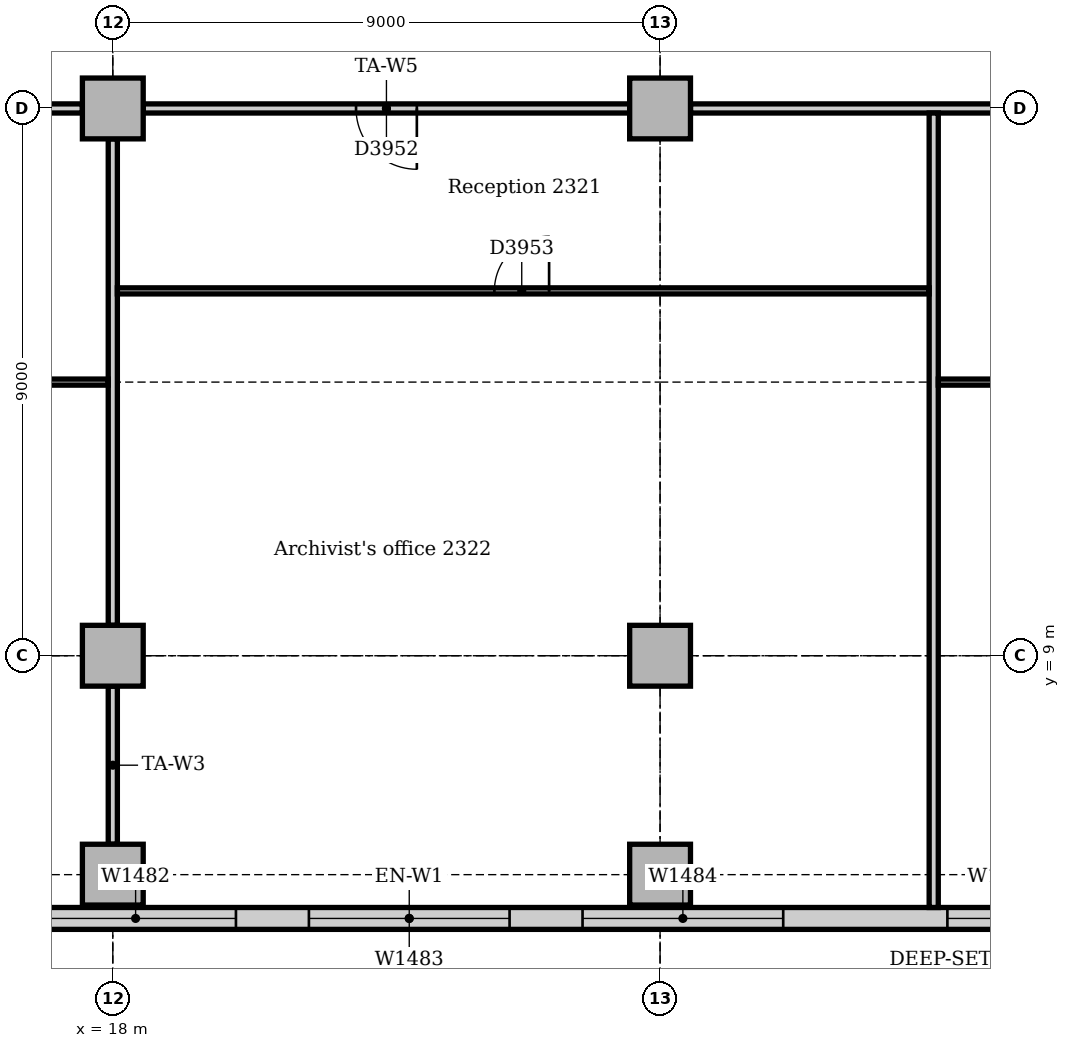
"""IFC4 building model, lengths in metres.
Left out: names, types, materials, properties, quantities, classifications, styles, units other than length and angle.
Written with IfcOpenShell. Run it as: python <this file> out.ifc"""

import sys

from ifc_helpers import new_model, si_unit, direction, frame, frame_2d, origin, origin_2d, place, context, subcontext, project, spatial, rectangle, extrude, element, fill, save


model = new_model("IFC4")
c1 = context("Model", 3, precision=1e-05, world=origin(), true_north=direction((0.0, 1.0)))
c2 = subcontext(c1, "Body", "Model", "MODEL_VIEW")
j1 = project(units=[si_unit("LENGTHUNIT", "METRE"), si_unit("PLANEANGLEUNIT", "RADIAN")], contexts=[c1])
p1 = place(None, origin())
s1 = spatial("IfcSite", under=j1, at=p1, CompositionType="ELEMENT")
p2 = place(p1, origin())
s2 = spatial("IfcBuilding", under=s1, at=p2, CompositionType="ELEMENT")
p3 = place(p2, frame((0.0, 0.0, 100.0)))
s3 = spatial("IfcBuildingStorey", under=s2, at=p3, CompositionType="ELEMENT", Elevation=100.0)
for number, where, z_axis, x_axis in (
    (1, (18.0, 5.4, -0.15), (0.0, 0.0, 1.0), (1.0, 0.0, 0.0)),
    (2, (27.0, 5.4, -0.15), (0.0, 0.0, 1.0), (1.0, 0.0, 0.0)),
):
    element("IfcColumn", number, at=place(p3, frame(where, z_axis=z_axis, x_axis=x_axis)), inside=s3, PredefinedType="COLUMN", context=c2, shape_type="SweptSolid", body=[
        extrude(rectangle(XDim=1.0, YDim=1.0, at=origin_2d()), origin(), (0.0, 0.0, 1.0), 4.0),
    ])
for number, where, z_axis, x_axis in (
    (3, (18.0, 9.0, 0.0), (0.0, 0.0, 1.0), (1.0, 0.0, 0.0)),
    (4, (18.0, 18.0, 0.0), (0.0, 0.0, 1.0), (1.0, 0.0, 0.0)),
    (5, (27.0, 9.0, 0.0), (0.0, 0.0, 1.0), (1.0, 0.0, 0.0)),
    (6, (27.0, 18.0, 0.0), (0.0, 0.0, 1.0), (1.0, 0.0, 0.0)),
):
    element("IfcColumn", number, at=place(p3, frame(where, z_axis=z_axis, x_axis=x_axis)), inside=s3, PredefinedType="COLUMN", context=c2, shape_type="SweptSolid", body=[
        extrude(rectangle(XDim=1.0, YDim=1.0, at=origin_2d()), origin(), (0.0, 0.0, 1.0), 3.85),
    ])
p4 = place(p3, frame((4.243, 4.68, 0.0), z_axis=(0.0, 0.0, 1.0), x_axis=(1.0, 0.0, 0.0)))
e7 = element("IfcWall", 7, at=p4, inside=s3, PredefinedType="STANDARD", context=c2, shape_type="SweptSolid", body=[
    extrude(rectangle(XDim=37.265, YDim=0.36, at=frame_2d((18.632, 0.0))), origin(), (0.0, 0.0, 1.0), 3.85),
])
p5 = place(p4, frame((3.482, 0.0, 0.9)))
e8 = element("IfcOpeningElement", 8, at=p5, cuts=e7, PredefinedType="OPENING", context=c2, shape_type="SweptSolid", body=[
    extrude(rectangle(XDim=3.3, YDim=1.6, at=frame_2d((1.65, 0.8))), frame((0.0, 0.19, 0.0), z_axis=(0.0, -1.0, 0.0), x_axis=(1.0, 0.0, 0.0)), (0.0, 0.0, 1.0), 0.38),
])
p6 = place(p4, frame((8.732, 0.0, 0.0)))
e9 = element("IfcOpeningElement", 9, at=p6, cuts=e7, PredefinedType="OPENING", context=c2, shape_type="SweptSolid", body=[
    extrude(rectangle(XDim=1.8, YDim=2.4, at=frame_2d((0.9, 1.2))), frame((0.0, 0.19, 0.0), z_axis=(0.0, -1.0, 0.0), x_axis=(1.0, 0.0, 0.0)), (0.0, 0.0, 1.0), 0.38),
])
p7 = place(p4, frame((12.482, 0.0, 0.9)))
e10 = element("IfcOpeningElement", 10, at=p7, cuts=e7, PredefinedType="OPENING", context=c2, shape_type="SweptSolid", body=[
    extrude(rectangle(XDim=3.3, YDim=1.6, at=frame_2d((1.65, 0.8))), frame((0.0, 0.19, 0.0), z_axis=(0.0, -1.0, 0.0), x_axis=(1.0, 0.0, 0.0)), (0.0, 0.0, 1.0), 0.38),
])
p8 = place(p4, frame((16.982, 0.0, 0.9)))
e11 = element("IfcOpeningElement", 11, at=p8, cuts=e7, PredefinedType="OPENING", context=c2, shape_type="SweptSolid", body=[
    extrude(rectangle(XDim=3.3, YDim=1.6, at=frame_2d((1.65, 0.8))), frame((0.0, 0.19, 0.0), z_axis=(0.0, -1.0, 0.0), x_axis=(1.0, 0.0, 0.0)), (0.0, 0.0, 1.0), 0.38),
])
p9 = place(p4, frame((21.482, 0.0, 0.9)))
e12 = element("IfcOpeningElement", 12, at=p9, cuts=e7, PredefinedType="OPENING", context=c2, shape_type="SweptSolid", body=[
    extrude(rectangle(XDim=3.3, YDim=1.6, at=frame_2d((1.65, 0.8))), frame((0.0, 0.19, 0.0), z_axis=(0.0, -1.0, 0.0), x_axis=(1.0, 0.0, 0.0)), (0.0, 0.0, 1.0), 0.38),
])
p10 = place(p4, frame((27.482, 0.0, 0.9)))
e13 = element("IfcOpeningElement", 13, at=p10, cuts=e7, PredefinedType="OPENING", context=c2, shape_type="SweptSolid", body=[
    extrude(rectangle(XDim=1.8, YDim=1.6, at=frame_2d((0.9, 0.8))), frame((0.0, 0.19, 0.0), z_axis=(0.0, -1.0, 0.0), x_axis=(1.0, 0.0, 0.0)), (0.0, 0.0, 1.0), 0.38),
])
p11 = place(p4, frame((30.482, 0.0, 0.9)))
e14 = element("IfcOpeningElement", 14, at=p11, cuts=e7, PredefinedType="OPENING", context=c2, shape_type="SweptSolid", body=[
    extrude(rectangle(XDim=3.3, YDim=1.6, at=frame_2d((1.65, 0.8))), frame((0.0, 0.19, 0.0), z_axis=(0.0, -1.0, 0.0), x_axis=(1.0, 0.0, 0.0)), (0.0, 0.0, 1.0), 0.38),
])
p12 = place(p3, frame((27.5, 18.0, 0.0), z_axis=(0.0, 0.0, 1.0), x_axis=(1.0, 0.0, 0.0)))
e15 = element("IfcWall", 15, at=p12, inside=s3, PredefinedType="PARTITIONING", context=c2, shape_type="SweptSolid", body=[
    extrude(rectangle(XDim=8.0, YDim=0.15, at=frame_2d((4.0, 0.0))), origin(), (0.0, 0.0, 1.0), 3.158),
])
p13 = place(p3, frame((18.5, 18.0, 0.0), z_axis=(0.0, 0.0, 1.0), x_axis=(1.0, 0.0, 0.0)))
e16 = element("IfcWall", 16, at=p13, inside=s3, PredefinedType="PARTITIONING", context=c2, shape_type="SweptSolid", body=[
    extrude(rectangle(XDim=8.0, YDim=0.15, at=frame_2d((4.0, 0.0))), origin(), (0.0, 0.0, 1.0), 3.158),
])
p14 = place(p13, frame((3.5, 0.0, 0.0)))
e17 = element("IfcOpeningElement", 17, at=p14, cuts=e16, PredefinedType="OPENING", context=c2, shape_type="SweptSolid", body=[
    extrude(rectangle(XDim=1.0, YDim=2.1, at=frame_2d((0.5, 1.05))), frame((0.0, 0.085, 0.0), z_axis=(0.0, -1.0, 0.0), x_axis=(1.0, 0.0, 0.0)), (0.0, 0.0, 1.0), 0.17),
])
p15 = place(p3, frame((9.5, 18.0, 0.0), z_axis=(0.0, 0.0, 1.0), x_axis=(1.0, 0.0, 0.0)))
e18 = element("IfcWall", 18, at=p15, inside=s3, PredefinedType="PARTITIONING", context=c2, shape_type="SweptSolid", body=[
    extrude(rectangle(XDim=8.0, YDim=0.15, at=frame_2d((4.0, 0.0))), origin(), (0.0, 0.0, 1.0), 3.158),
])
p16 = place(p15, frame((3.5, 0.0, 0.0)))
e19 = element("IfcOpeningElement", 19, at=p16, cuts=e18, PredefinedType="OPENING", context=c2, shape_type="SweptSolid", body=[
    extrude(rectangle(XDim=1.0, YDim=2.1, at=frame_2d((0.5, 1.05))), frame((0.0, 0.085, 0.0), z_axis=(0.0, -1.0, 0.0), x_axis=(1.0, 0.0, 0.0)), (0.0, 0.0, 1.0), 0.17),
])
p17 = place(p3, frame((18.0, 5.9, 0.0), z_axis=(0.0, 0.0, 1.0), x_axis=(0.0, 1.0, 0.0)))
e20 = element("IfcWall", 20, at=p17, inside=s3, PredefinedType="PARTITIONING", context=c2, shape_type="SweptSolid", body=[
    extrude(rectangle(XDim=2.6, YDim=0.15, at=frame_2d((1.3, 0.0))), origin(), (0.0, 0.0, 1.0), 3.652),
])
p18 = place(p3, frame((18.0, 9.5, 0.0), z_axis=(0.0, 0.0, 1.0), x_axis=(0.0, 1.0, 0.0)))
e21 = element("IfcWall", 21, at=p18, inside=s3, PredefinedType="PARTITIONING", context=c2, shape_type="SweptSolid", body=[
    extrude(rectangle(XDim=8.0, YDim=0.15, at=frame_2d((4.0, 0.0))), origin(), (0.0, 0.0, 1.0), 3.256),
])
p19 = place(p3, frame((31.5, 4.86, 0.0), z_axis=(0.0, 0.0, 1.0), x_axis=(0.0, 1.0, 0.0)))
e22 = element("IfcWall", 22, at=p19, inside=s3, PredefinedType="PARTITIONING", context=c2, shape_type="SweptSolid", body=[
    extrude(rectangle(XDim=13.065, YDim=0.15, at=frame_2d((6.532, 0.0))), origin(), (0.0, 0.0, 1.0), 3.85),
])
p20 = place(p3, frame((31.575, 13.5, 0.0), z_axis=(0.0, 0.0, 1.0), x_axis=(1.0, 0.0, 0.0)))
e23 = element("IfcWall", 23, at=p20, inside=s3, PredefinedType="PARTITIONING", context=c2, shape_type="SweptSolid", body=[
    extrude(rectangle(XDim=13.35, YDim=0.1, at=frame_2d((6.675, 0.0))), origin(), (0.0, 0.0, 1.0), 3.354),
])
p21 = place(p20, frame((2.95, 0.0, 0.0)))
e24 = element("IfcOpeningElement", 24, at=p21, cuts=e23, PredefinedType="OPENING", context=c2, shape_type="SweptSolid", body=[
    extrude(rectangle(XDim=0.9, YDim=2.1, at=frame_2d((0.45, 1.05))), frame((0.0, 0.06, 0.0), z_axis=(0.0, -1.0, 0.0), x_axis=(1.0, 0.0, 0.0)), (0.0, 0.0, 1.0), 0.12),
])
p22 = place(p20, frame((9.475, 0.0, 0.0)))
e25 = element("IfcOpeningElement", 25, at=p22, cuts=e23, PredefinedType="OPENING", context=c2, shape_type="SweptSolid", body=[
    extrude(rectangle(XDim=0.9, YDim=2.1, at=frame_2d((0.45, 1.05))), frame((0.0, 0.06, 0.0), z_axis=(0.0, -1.0, 0.0), x_axis=(1.0, 0.0, 0.0)), (0.0, 0.0, 1.0), 0.12),
])
p23 = place(p3, frame((0.36, 13.5, 0.0), z_axis=(0.0, 0.0, 1.0), x_axis=(1.0, 0.0, 0.0)))
e26 = element("IfcWall", 26, at=p23, inside=s3, PredefinedType="PARTITIONING", context=c2, shape_type="SweptSolid", body=[
    extrude(rectangle(XDim=17.565, YDim=0.1, at=frame_2d((8.783, 0.0))), origin(), (0.0, 0.0, 1.0), 3.354),
])
p24 = place(p23, frame((3.95, 0.0, 0.0)))
e27 = element("IfcOpeningElement", 27, at=p24, cuts=e26, PredefinedType="OPENING", context=c2, shape_type="SweptSolid", body=[
    extrude(rectangle(XDim=0.9, YDim=2.1, at=frame_2d((0.45, 1.05))), frame((0.0, 0.06, 0.0), z_axis=(0.0, -1.0, 0.0), x_axis=(1.0, 0.0, 0.0)), (0.0, 0.0, 1.0), 0.12),
])
p25 = place(p23, frame((12.59, 0.0, 0.0)))
e28 = element("IfcOpeningElement", 28, at=p25, cuts=e26, PredefinedType="OPENING", context=c2, shape_type="SweptSolid", body=[
    extrude(rectangle(XDim=0.9, YDim=2.1, at=frame_2d((0.45, 1.05))), frame((0.0, 0.06, 0.0), z_axis=(0.0, -1.0, 0.0), x_axis=(1.0, 0.0, 0.0)), (0.0, 0.0, 1.0), 0.12),
])
p26 = place(p3, frame((18.075, 15.0, 0.0), z_axis=(0.0, 0.0, 1.0), x_axis=(1.0, 0.0, 0.0)))
e29 = element("IfcWall", 29, at=p26, inside=s3, PredefinedType="PARTITIONING", context=c2, shape_type="SweptSolid", body=[
    extrude(rectangle(XDim=13.35, YDim=0.1, at=frame_2d((6.675, 0.0))), origin(), (0.0, 0.0, 1.0), 3.85),
])
p27 = place(p26, frame((6.2, 0.0, 0.0)))
e30 = element("IfcOpeningElement", 30, at=p27, cuts=e29, PredefinedType="OPENING", context=c2, shape_type="SweptSolid", body=[
    extrude(rectangle(XDim=0.9, YDim=2.1, at=frame_2d((0.45, 1.05))), frame((0.0, 0.06, 0.0), z_axis=(0.0, -1.0, 0.0), x_axis=(1.0, 0.0, 0.0)), (0.0, 0.0, 1.0), 0.12),
])
p28 = place(p7, origin())
e31 = element("IfcWindow", 31, at=p28, inside=s3, PartitioningType="SINGLE_PANEL", PredefinedType="WINDOW", context=c2, shape_type="SweptSolid", body=[
    extrude(rectangle(XDim=3.3, YDim=1.6, at=frame_2d((1.65, 0.8))), frame((0.0, 0.13, 0.0), z_axis=(0.0, -1.0, 0.0), x_axis=(1.0, 0.0, 0.0)), (0.0, 0.0, 1.0), 0.06),
])
fill(e10, e31)
p29 = place(p8, origin())
e32 = element("IfcWindow", 32, at=p29, inside=s3, PartitioningType="SINGLE_PANEL", PredefinedType="WINDOW", context=c2, shape_type="SweptSolid", body=[
    extrude(rectangle(XDim=3.3, YDim=1.6, at=frame_2d((1.65, 0.8))), frame((0.0, 0.13, 0.0), z_axis=(0.0, -1.0, 0.0), x_axis=(1.0, 0.0, 0.0)), (0.0, 0.0, 1.0), 0.06),
])
fill(e11, e32)
p30 = place(p9, origin())
e33 = element("IfcWindow", 33, at=p30, inside=s3, PartitioningType="SINGLE_PANEL", PredefinedType="WINDOW", context=c2, shape_type="SweptSolid", body=[
    extrude(rectangle(XDim=3.3, YDim=1.6, at=frame_2d((1.65, 0.8))), frame((0.0, 0.13, 0.0), z_axis=(0.0, -1.0, 0.0), x_axis=(1.0, 0.0, 0.0)), (0.0, 0.0, 1.0), 0.06),
])
fill(e12, e33)
p31 = place(p10, origin())
e34 = element("IfcWindow", 34, at=p31, inside=s3, PartitioningType="SINGLE_PANEL", PredefinedType="WINDOW", context=c2, shape_type="SweptSolid", body=[
    extrude(rectangle(XDim=1.8, YDim=1.6, at=frame_2d((0.9, 0.8))), frame((0.0, 0.13, 0.0), z_axis=(0.0, -1.0, 0.0), x_axis=(1.0, 0.0, 0.0)), (0.0, 0.0, 1.0), 0.06),
])
fill(e13, e34)
p32 = place(p14, frame((1.0, 0.0, 0.0), z_axis=(0.0, 0.0, 1.0), x_axis=(-1.0, 0.0, 0.0)))
e35 = element("IfcDoor", 35, at=p32, inside=s3, OperationType="SINGLE_SWING_LEFT", PredefinedType="DOOR", context=c2, shape_type="SweptSolid", body=[
    extrude(rectangle(XDim=1.0, YDim=2.1, at=frame_2d((0.5, 1.05))), frame((0.0, 0.025, 0.0), z_axis=(0.0, -1.0, 0.0), x_axis=(1.0, 0.0, 0.0)), (0.0, 0.0, 1.0), 0.05),
])
fill(e17, e35)
p33 = place(p27, origin())
e36 = element("IfcDoor", 36, at=p33, inside=s3, OperationType="SINGLE_SWING_RIGHT", PredefinedType="DOOR", context=c2, shape_type="SweptSolid", body=[
    extrude(rectangle(XDim=0.9, YDim=2.1, at=frame_2d((0.45, 1.05))), frame((0.0, 0.025, 0.0), z_axis=(0.0, -1.0, 0.0), x_axis=(1.0, 0.0, 0.0)), (0.0, 0.0, 1.0), 0.05),
])
fill(e30, e36)
save(model, sys.argv[1])
